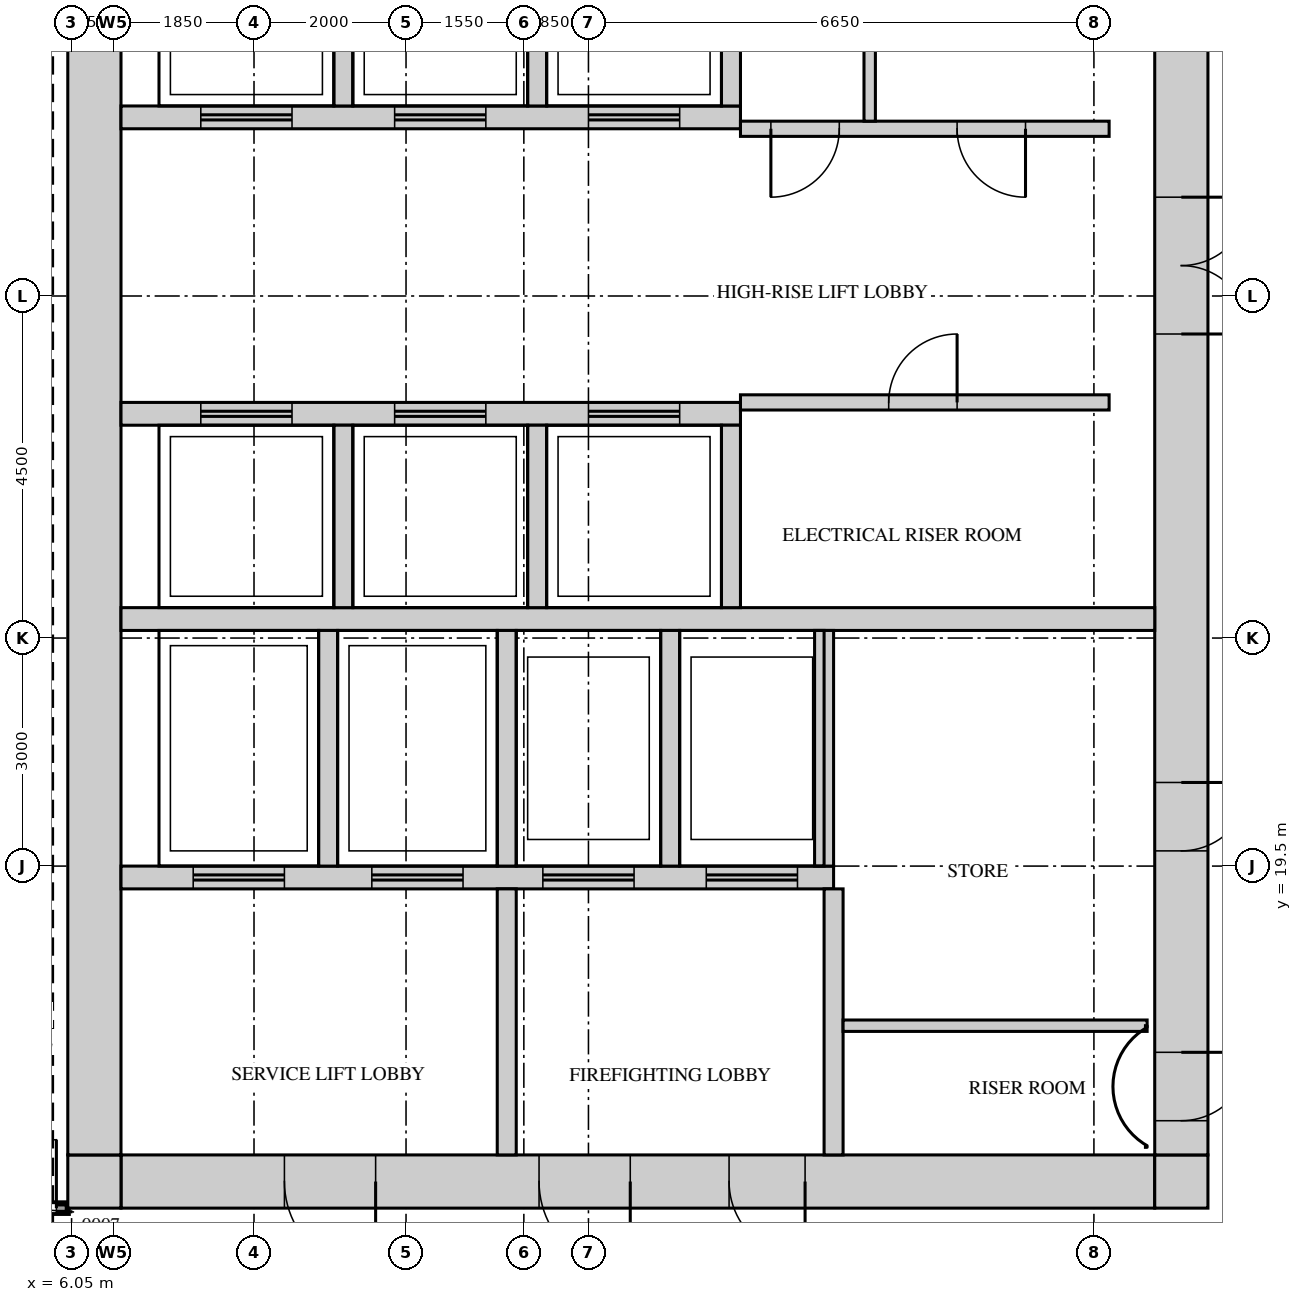
"""IFC4 building model, lengths in metres.
Left out: names, types, materials, properties, quantities, classifications, styles, units other than length and angle.
Written with IfcOpenShell. Run it as: python <this file> out.ifc"""

import sys

from ifc_helpers import new_model, si_unit, direction, frame, frame_2d, origin, place, context, subcontext, project, spatial, rectangle, extrude, source, transform, mapped, element, fill, save


model = new_model("IFC4")
c1 = context("Model", 3, precision=1e-05, world=origin(), true_north=direction((0.0, 1.0)))
c2 = subcontext(c1, "Body", "Model", "MODEL_VIEW")
j1 = project(units=[si_unit("LENGTHUNIT", "METRE"), si_unit("PLANEANGLEUNIT", "RADIAN")], contexts=[c1])
p1 = place(None, origin())
s1 = spatial("IfcSite", under=j1, at=p1, CompositionType="ELEMENT")
p2 = place(p1, origin())
s2 = spatial("IfcBuilding", under=s1, at=p2, CompositionType="ELEMENT")
p3 = place(p2, frame((0.0, 0.0, 266.2)))
s3 = spatial("IfcBuildingStorey", under=s2, at=p3, CompositionType="ELEMENT", Elevation=266.2)
m1 = source(origin(), c2, "Body", "SweptSolid", [
    extrude(rectangle(XDim=13.6, YDim=0.7, at=frame_2d((6.8, 0.0))), origin(), (0.0, 0.0, 1.0), 3.75),
])
p4 = place(p3, frame((6.7, 15.35, 0.0), z_axis=(0.0, 0.0, 1.0), x_axis=(1.0, 0.0, 0.0)))
e1 = element("IfcWall", 1, at=p4, inside=s3, PredefinedType="SHEAR", context=c2, shape_type="MappedRepresentation", body=[
    mapped(m1, transform((0.0, 0.0, 0.0))),
])
m2 = source(origin(), c2, "Body", "SweptSolid", [
    extrude(rectangle(XDim=1.2, YDim=2.1, at=frame_2d((0.6, 1.05))), frame((0.0, 0.36, 0.0), z_axis=(0.0, -1.0, 0.0), x_axis=(1.0, 0.0, 0.0)), (0.0, 0.0, 1.0), 0.72),
])
p5 = place(p4, frame((5.5, 0.0, 0.0)))
e2 = element("IfcOpeningElement", 2, at=p5, cuts=e1, PredefinedType="OPENING", context=c2, shape_type="MappedRepresentation", body=[
    mapped(m2, transform((0.0, 0.0, 0.0))),
])
p6 = place(p4, frame((2.15, 0.0, 0.0)))
e3 = element("IfcOpeningElement", 3, at=p6, cuts=e1, PredefinedType="OPENING", context=c2, shape_type="MappedRepresentation", body=[
    mapped(m2, transform((0.0, 0.0, 0.0))),
])
m3 = source(origin(), c2, "Body", "SweptSolid", [
    extrude(rectangle(XDim=1.0, YDim=2.1, at=frame_2d((0.5, 1.05))), frame((0.0, 0.36, 0.0), z_axis=(0.0, -1.0, 0.0), x_axis=(1.0, 0.0, 0.0)), (0.0, 0.0, 1.0), 0.72),
])
p7 = place(p4, frame((8.0, 0.0, 0.0)))
e4 = element("IfcOpeningElement", 4, at=p7, cuts=e1, PredefinedType="OPENING", context=c2, shape_type="MappedRepresentation", body=[
    mapped(m3, transform((0.0, 0.0, 0.0))),
])
m4 = source(origin(), c2, "Body", "SweptSolid", [
    extrude(rectangle(XDim=0.7, YDim=0.7, at=frame_2d((0.35, 0.0))), origin(), (0.0, 0.0, 1.0), 3.75),
])
for number, where, z_axis, x_axis in (
    (5, (20.3, 15.35, 0.0), (0.0, 0.0, 1.0), (1.0, 0.0, 0.0)),
    (6, (6.0, 15.35, 0.0), (0.0, 0.0, 1.0), (1.0, 0.0, 0.0)),
):
    element("IfcWall", number, at=place(p3, frame(where, z_axis=z_axis, x_axis=x_axis)), inside=s3, PredefinedType="SHEAR", context=c2, shape_type="MappedRepresentation", body=[
        mapped(m4, transform((0.0, 0.0, 0.0))),
    ])
m5 = source(origin(), c2, "Body", "SweptSolid", [
    extrude(rectangle(XDim=22.6, YDim=0.7, at=frame_2d((11.3, 0.0))), origin(), (0.0, 0.0, 1.0), 3.75),
])
p8 = place(p3, frame((20.65, 15.7, 0.0), z_axis=(0.0, 0.0, 1.0), x_axis=(0.0, 1.0, 0.0)))
e7 = element("IfcWall", 7, at=p8, inside=s3, PredefinedType="SHEAR", context=c2, shape_type="MappedRepresentation", body=[
    mapped(m5, transform((0.0, 0.0, 0.0))),
])
m6 = source(origin(), c2, "Body", "SweptSolid", [
    extrude(rectangle(XDim=1.8, YDim=2.1, at=frame_2d((0.9, 1.05))), frame((0.0, 0.36, 0.0), z_axis=(0.0, -1.0, 0.0), x_axis=(1.0, 0.0, 0.0)), (0.0, 0.0, 1.0), 0.72),
])
p9 = place(p8, frame((10.8, 0.0, 0.0)))
e8 = element("IfcOpeningElement", 8, at=p9, cuts=e7, PredefinedType="OPENING", context=c2, shape_type="MappedRepresentation", body=[
    mapped(m6, transform((0.0, 0.0, 0.0))),
])
m7 = source(origin(), c2, "Body", "SweptSolid", [
    extrude(rectangle(XDim=0.9, YDim=2.1, at=frame_2d((0.45, 1.05))), frame((0.0, 0.36, 0.0), z_axis=(0.0, -1.0, 0.0), x_axis=(1.0, 0.0, 0.0)), (0.0, 0.0, 1.0), 0.72),
])
p10 = place(p8, frame((0.45, 0.0, 0.0)))
e9 = element("IfcOpeningElement", 9, at=p10, cuts=e7, PredefinedType="OPENING", context=c2, shape_type="MappedRepresentation", body=[
    mapped(m7, transform((0.0, 0.0, 0.0))),
])
p11 = place(p8, frame((4.0, 0.0, 0.0)))
e10 = element("IfcOpeningElement", 10, at=p11, cuts=e7, PredefinedType="OPENING", context=c2, shape_type="MappedRepresentation", body=[
    mapped(m7, transform((0.0, 0.0, 0.0))),
])
p12 = place(p3, frame((6.35, 15.7, 0.0), z_axis=(0.0, 0.0, 1.0), x_axis=(0.0, 1.0, 0.0)))
e11 = element("IfcWall", 11, at=p12, inside=s3, PredefinedType="SHEAR", context=c2, shape_type="MappedRepresentation", body=[
    mapped(m5, transform((0.0, 0.0, 0.0))),
])
m8 = source(origin(), c2, "Body", "SweptSolid", [
    extrude(rectangle(XDim=13.6, YDim=0.3, at=frame_2d((6.8, 0.0))), origin(), (0.0, 0.0, 1.0), 3.75),
])
p13 = place(p3, frame((6.7, 22.75, 0.0), z_axis=(0.0, 0.0, 1.0), x_axis=(1.0, 0.0, 0.0)))
e12 = element("IfcWall", 12, at=p13, inside=s3, PredefinedType="STANDARD", context=c2, shape_type="MappedRepresentation", body=[
    mapped(m8, transform((0.0, 0.0, 0.0))),
])
m9 = source(origin(), c2, "Body", "SweptSolid", [
    extrude(rectangle(XDim=9.375, YDim=0.3, at=frame_2d((4.688, 0.0))), origin(), (0.0, 0.0, 1.0), 3.75),
])
p14 = place(p3, frame((6.7, 19.35, 0.0), z_axis=(0.0, 0.0, 1.0), x_axis=(1.0, 0.0, 0.0)))
e13 = element("IfcWall", 13, at=p14, inside=s3, PredefinedType="STANDARD", context=c2, shape_type="MappedRepresentation", body=[
    mapped(m9, transform((0.0, 0.0, 0.0))),
])
m10 = source(origin(), c2, "Body", "SweptSolid", [
    extrude(rectangle(XDim=1.2, YDim=2.1, at=frame_2d((0.6, 1.05))), frame((0.0, 0.16, 0.0), z_axis=(0.0, -1.0, 0.0), x_axis=(1.0, 0.0, 0.0)), (0.0, 0.0, 1.0), 0.32),
])
p15 = place(p14, frame((0.95, 0.0, 0.0)))
e14 = element("IfcOpeningElement", 14, at=p15, cuts=e13, PredefinedType="OPENING", context=c2, shape_type="MappedRepresentation", body=[
    mapped(m10, transform((0.0, 0.0, 0.0))),
])
p16 = place(p14, frame((3.3, 0.0, 0.0)))
e15 = element("IfcOpeningElement", 15, at=p16, cuts=e13, PredefinedType="OPENING", context=c2, shape_type="MappedRepresentation", body=[
    mapped(m10, transform((0.0, 0.0, 0.0))),
])
p17 = place(p14, frame((5.55, 0.0, 0.0)))
e16 = element("IfcOpeningElement", 16, at=p17, cuts=e13, PredefinedType="OPENING", context=c2, shape_type="MappedRepresentation", body=[
    mapped(m10, transform((0.0, 0.0, 0.0))),
])
p18 = place(p14, frame((7.7, 0.0, 0.0)))
e17 = element("IfcOpeningElement", 17, at=p18, cuts=e13, PredefinedType="OPENING", context=c2, shape_type="MappedRepresentation", body=[
    mapped(m10, transform((0.0, 0.0, 0.0))),
])
m11 = source(origin(), c2, "Body", "SweptSolid", [
    extrude(rectangle(XDim=8.15, YDim=0.3, at=frame_2d((4.075, 0.0))), origin(), (0.0, 0.0, 1.0), 3.75),
])
p19 = place(p3, frame((6.7, 29.35, 0.0), z_axis=(0.0, 0.0, 1.0), x_axis=(1.0, 0.0, 0.0)))
e18 = element("IfcWall", 18, at=p19, inside=s3, PredefinedType="STANDARD", context=c2, shape_type="MappedRepresentation", body=[
    mapped(m11, transform((0.0, 0.0, 0.0))),
])
p20 = place(p19, frame((1.05, 0.0, 0.0)))
e19 = element("IfcOpeningElement", 19, at=p20, cuts=e18, PredefinedType="OPENING", context=c2, shape_type="MappedRepresentation", body=[
    mapped(m10, transform((0.0, 0.0, 0.0))),
])
p21 = place(p19, frame((3.6, 0.0, 0.0)))
e20 = element("IfcOpeningElement", 20, at=p21, cuts=e18, PredefinedType="OPENING", context=c2, shape_type="MappedRepresentation", body=[
    mapped(m10, transform((0.0, 0.0, 0.0))),
])
p22 = place(p19, frame((6.15, 0.0, 0.0)))
e21 = element("IfcOpeningElement", 21, at=p22, cuts=e18, PredefinedType="OPENING", context=c2, shape_type="MappedRepresentation", body=[
    mapped(m10, transform((0.0, 0.0, 0.0))),
])
p23 = place(p3, frame((6.7, 25.45, 0.0), z_axis=(0.0, 0.0, 1.0), x_axis=(1.0, 0.0, 0.0)))
e22 = element("IfcWall", 22, at=p23, inside=s3, PredefinedType="STANDARD", context=c2, shape_type="MappedRepresentation", body=[
    mapped(m11, transform((0.0, 0.0, 0.0))),
])
p24 = place(p23, frame((1.05, 0.0, 0.0)))
e23 = element("IfcOpeningElement", 23, at=p24, cuts=e22, PredefinedType="OPENING", context=c2, shape_type="MappedRepresentation", body=[
    mapped(m10, transform((0.0, 0.0, 0.0))),
])
p25 = place(p23, frame((3.6, 0.0, 0.0)))
e24 = element("IfcOpeningElement", 24, at=p25, cuts=e22, PredefinedType="OPENING", context=c2, shape_type="MappedRepresentation", body=[
    mapped(m10, transform((0.0, 0.0, 0.0))),
])
p26 = place(p23, frame((6.15, 0.0, 0.0)))
e25 = element("IfcOpeningElement", 25, at=p26, cuts=e22, PredefinedType="OPENING", context=c2, shape_type="MappedRepresentation", body=[
    mapped(m10, transform((0.0, 0.0, 0.0))),
])
m12 = source(origin(), c2, "Body", "SweptSolid", [
    extrude(rectangle(XDim=3.1, YDim=0.25, at=frame_2d((1.55, 0.0))), origin(), (0.0, 0.0, 1.0), 3.75),
])
for number, where, z_axis, x_axis in (
    (26, (9.425, 19.5, 0.0), (0.0, 0.0, 1.0), (0.0, 1.0, 0.0)),
    (27, (11.775, 19.5, 0.0), (0.0, 0.0, 1.0), (0.0, 1.0, 0.0)),
    (28, (13.925, 19.5, 0.0), (0.0, 0.0, 1.0), (0.0, 1.0, 0.0)),
    (29, (15.95, 19.5, 0.0), (0.0, 0.0, 1.0), (0.0, 1.0, 0.0)),
):
    element("IfcWall", number, at=place(p3, frame(where, z_axis=z_axis, x_axis=x_axis)), inside=s3, PredefinedType="STANDARD", context=c2, shape_type="MappedRepresentation", body=[
        mapped(m12, transform((0.0, 0.0, 0.0))),
    ])
m13 = source(origin(), c2, "Body", "SweptSolid", [
    extrude(rectangle(XDim=2.4, YDim=0.25, at=frame_2d((1.2, 0.0))), origin(), (0.0, 0.0, 1.0), 3.75),
])
for number, where, z_axis, x_axis in (
    (30, (9.625, 29.5, 0.0), (0.0, 0.0, 1.0), (0.0, 1.0, 0.0)),
    (31, (12.175, 29.5, 0.0), (0.0, 0.0, 1.0), (0.0, 1.0, 0.0)),
    (32, (14.725, 29.5, 0.0), (0.0, 0.0, 1.0), (0.0, 1.0, 0.0)),
):
    element("IfcWall", number, at=place(p3, frame(where, z_axis=z_axis, x_axis=x_axis)), inside=s3, PredefinedType="STANDARD", context=c2, shape_type="MappedRepresentation", body=[
        mapped(m13, transform((0.0, 0.0, 0.0))),
    ])
m14 = source(origin(), c2, "Body", "SweptSolid", [
    extrude(rectangle(XDim=2.4, YDim=0.25, at=frame_2d((1.2, 0.0))), origin(), (0.0, 0.0, 1.0), 3.75),
])
for number, where, z_axis, x_axis in (
    (33, (9.625, 22.9, 0.0), (0.0, 0.0, 1.0), (0.0, 1.0, 0.0)),
    (34, (12.175, 22.9, 0.0), (0.0, 0.0, 1.0), (0.0, 1.0, 0.0)),
    (35, (14.725, 22.9, 0.0), (0.0, 0.0, 1.0), (0.0, 1.0, 0.0)),
):
    element("IfcWall", number, at=place(p3, frame(where, z_axis=z_axis, x_axis=x_axis)), inside=s3, PredefinedType="STANDARD", context=c2, shape_type="MappedRepresentation", body=[
        mapped(m14, transform((0.0, 0.0, 0.0))),
    ])
m15 = source(origin(), c2, "Body", "SweptSolid", [
    extrude(rectangle(XDim=3.5, YDim=0.25, at=frame_2d((1.75, 0.0))), origin(), (0.0, 0.0, 1.0), 3.75),
])
for number, where, z_axis, x_axis in (
    (36, (16.075, 15.7, 0.0), (0.0, 0.0, 1.0), (0.0, 1.0, 0.0)),
    (37, (11.775, 15.7, 0.0), (0.0, 0.0, 1.0), (0.0, 1.0, 0.0)),
):
    element("IfcWall", number, at=place(p3, frame(where, z_axis=z_axis, x_axis=x_axis)), inside=s3, PredefinedType="STANDARD", context=c2, shape_type="MappedRepresentation", body=[
        mapped(m15, transform((0.0, 0.0, 0.0))),
    ])
m16 = source(origin(), c2, "Body", "SweptSolid", [
    extrude(rectangle(XDim=1.35, YDim=0.125, at=frame_2d((0.675, 0.0))), origin(), (0.0, 0.0, 1.0), 3.8),
])
p27 = place(p3, frame((4.65, 15.0, 0.0), z_axis=(0.0, 0.0, 1.0), x_axis=(1.0, 0.0, 0.0)))
e38 = element("IfcWall", 38, at=p27, inside=s3, PredefinedType="PARTITIONING", context=c2, shape_type="MappedRepresentation", body=[
    mapped(m16, transform((0.0, 0.0, 0.0))),
])
m17 = source(origin(), c2, "Body", "SweptSolid", [
    extrude(rectangle(XDim=0.9, YDim=2.1, at=frame_2d((0.45, 1.05))), frame((0.0, 0.073, 0.0), z_axis=(0.0, -1.0, 0.0), x_axis=(1.0, 0.0, 0.0)), (0.0, 0.0, 1.0), 0.145),
])
p28 = place(p27, frame((0.3, 0.0, 0.0)))
e39 = element("IfcOpeningElement", 39, at=p28, cuts=e38, PredefinedType="OPENING", context=c2, shape_type="MappedRepresentation", body=[
    mapped(m17, transform((0.0, 0.0, 0.0))),
])
m18 = source(origin(), c2, "Body", "SweptSolid", [
    extrude(rectangle(XDim=4.0, YDim=0.15, at=frame_2d((2.0, 0.0))), origin(), (0.0, 0.0, 1.0), 3.8),
])
p29 = place(p3, frame((16.2, 17.4, 0.0), z_axis=(0.0, 0.0, 1.0), x_axis=(1.0, 0.0, 0.0)))
e40 = element("IfcWall", 40, at=p29, inside=s3, PredefinedType="PARTITIONING", context=c2, shape_type="MappedRepresentation", body=[
    mapped(m18, transform((0.0, 0.0, 0.0))),
])
m19 = source(origin(), c2, "Body", "SweptSolid", [
    extrude(rectangle(XDim=4.85, YDim=0.2, at=frame_2d((2.425, 0.0))), origin(), (0.0, 0.0, 1.0), 3.8),
])
p30 = place(p3, frame((14.85, 25.6, 0.0), z_axis=(0.0, 0.0, 1.0), x_axis=(1.0, 0.0, 0.0)))
e41 = element("IfcWall", 41, at=p30, inside=s3, PredefinedType="PARTITIONING", context=c2, shape_type="MappedRepresentation", body=[
    mapped(m19, transform((0.0, 0.0, 0.0))),
])
m20 = source(origin(), c2, "Body", "SweptSolid", [
    extrude(rectangle(XDim=0.9, YDim=2.1, at=frame_2d((0.45, 1.05))), frame((0.0, 0.11, 0.0), z_axis=(0.0, -1.0, 0.0), x_axis=(1.0, 0.0, 0.0)), (0.0, 0.0, 1.0), 0.22),
])
p31 = place(p30, frame((1.95, 0.0, 0.0)))
e42 = element("IfcOpeningElement", 42, at=p31, cuts=e41, PredefinedType="OPENING", context=c2, shape_type="MappedRepresentation", body=[
    mapped(m20, transform((0.0, 0.0, 0.0))),
])
p32 = place(p3, frame((14.85, 29.2, 0.0), z_axis=(0.0, 0.0, 1.0), x_axis=(1.0, 0.0, 0.0)))
e43 = element("IfcWall", 43, at=p32, inside=s3, PredefinedType="PARTITIONING", context=c2, shape_type="MappedRepresentation", body=[
    mapped(m19, transform((0.0, 0.0, 0.0))),
])
p33 = place(p32, frame((0.4, 0.0, 0.0)))
e44 = element("IfcOpeningElement", 44, at=p33, cuts=e43, PredefinedType="OPENING", context=c2, shape_type="MappedRepresentation", body=[
    mapped(m20, transform((0.0, 0.0, 0.0))),
])
p34 = place(p32, frame((2.85, 0.0, 0.0)))
e45 = element("IfcOpeningElement", 45, at=p34, cuts=e43, PredefinedType="OPENING", context=c2, shape_type="MappedRepresentation", body=[
    mapped(m20, transform((0.0, 0.0, 0.0))),
])
m21 = source(origin(), c2, "Body", "SweptSolid", [
    extrude(rectangle(XDim=2.8, YDim=0.15, at=frame_2d((1.4, 0.0))), origin(), (0.0, 0.0, 1.0), 3.8),
])
p35 = place(p3, frame((16.55, 29.3, 0.0), z_axis=(0.0, 0.0, 1.0), x_axis=(0.0, 1.0, 0.0)))
e46 = element("IfcWall", 46, at=p35, inside=s3, PredefinedType="PARTITIONING", context=c2, shape_type="MappedRepresentation", body=[
    mapped(m21, transform((0.0, 0.0, 0.0))),
])
m22 = source(origin(), c2, "Body", "SweptSolid", [
    extrude(rectangle(XDim=0.9, YDim=2.1, at=frame_2d((0.45, 1.05))), frame((0.0, 0.025, 0.0), z_axis=(0.0, -1.0, 0.0), x_axis=(1.0, 0.0, 0.0)), (0.0, 0.0, 1.0), 0.05),
])
p36 = place(p31, origin())
e47 = element("IfcDoor", 47, at=p36, inside=s3, OperationType="SINGLE_SWING_LEFT", PredefinedType="DOOR", context=c2, shape_type="MappedRepresentation", body=[
    mapped(m22, transform((0.0, 0.0, 0.0))),
])
fill(e42, e47)
p37 = place(p33, origin())
e48 = element("IfcDoor", 48, at=p37, inside=s3, OperationType="SINGLE_SWING_LEFT", PredefinedType="DOOR", context=c2, shape_type="MappedRepresentation", body=[
    mapped(m22, transform((0.0, 0.0, 0.0))),
])
fill(e44, e48)
p38 = place(p34, origin())
e49 = element("IfcDoor", 49, at=p38, inside=s3, OperationType="SINGLE_SWING_RIGHT", PredefinedType="DOOR", context=c2, shape_type="MappedRepresentation", body=[
    mapped(m22, transform((0.0, 0.0, 0.0))),
])
fill(e45, e49)
m23 = source(origin(), c2, "Body", "SweptSolid", [
    extrude(rectangle(XDim=1.8, YDim=2.1, at=frame_2d((0.9, 1.05))), frame((0.0, 0.3, 0.0), z_axis=(0.0, -1.0, 0.0), x_axis=(1.0, 0.0, 0.0)), (0.0, 0.0, 1.0), 0.6),
])
p39 = place(p9, origin())
e50 = element("IfcDoor", 50, at=p39, inside=s3, OperationType="DOUBLE_DOOR_SINGLE_SWING", PredefinedType="DOOR", context=c2, shape_type="MappedRepresentation", body=[
    mapped(m23, transform((0.0, 0.0, 0.0))),
])
fill(e8, e50)
m24 = source(origin(), c2, "Body", "SweptSolid", [
    extrude(rectangle(XDim=0.9, YDim=2.1, at=frame_2d((0.45, 1.05))), frame((0.0, 0.3, 0.0), z_axis=(0.0, -1.0, 0.0), x_axis=(1.0, 0.0, 0.0)), (0.0, 0.0, 1.0), 0.6),
])
p40 = place(p10, origin())
e51 = element("IfcDoor", 51, at=p40, inside=s3, OperationType="SINGLE_SWING_RIGHT", PredefinedType="DOOR", context=c2, shape_type="MappedRepresentation", body=[
    mapped(m24, transform((0.0, 0.0, 0.0))),
])
fill(e9, e51)
p41 = place(p11, origin())
e52 = element("IfcDoor", 52, at=p41, inside=s3, OperationType="SINGLE_SWING_RIGHT", PredefinedType="DOOR", context=c2, shape_type="MappedRepresentation", body=[
    mapped(m24, transform((0.0, 0.0, 0.0))),
])
fill(e10, e52)
m25 = source(origin(), c2, "Body", "SweptSolid", [
    extrude(rectangle(XDim=1.2, YDim=2.1, at=frame_2d((0.6, 1.05))), frame((0.0, 0.3, 0.0), z_axis=(0.0, -1.0, 0.0), x_axis=(1.0, 0.0, 0.0)), (0.0, 0.0, 1.0), 0.6),
])
p42 = place(p5, origin())
e53 = element("IfcDoor", 53, at=p42, inside=s3, OperationType="SINGLE_SWING_RIGHT", PredefinedType="DOOR", context=c2, shape_type="MappedRepresentation", body=[
    mapped(m25, transform((0.0, 0.0, 0.0))),
])
fill(e2, e53)
p43 = place(p6, origin())
e54 = element("IfcDoor", 54, at=p43, inside=s3, OperationType="SINGLE_SWING_RIGHT", PredefinedType="DOOR", context=c2, shape_type="MappedRepresentation", body=[
    mapped(m25, transform((0.0, 0.0, 0.0))),
])
fill(e3, e54)
m26 = source(origin(), c2, "Body", "SweptSolid", [
    extrude(rectangle(XDim=1.0, YDim=2.1, at=frame_2d((0.5, 1.05))), frame((0.0, 0.3, 0.0), z_axis=(0.0, -1.0, 0.0), x_axis=(1.0, 0.0, 0.0)), (0.0, 0.0, 1.0), 0.6),
])
p44 = place(p7, origin())
e55 = element("IfcDoor", 55, at=p44, inside=s3, OperationType="SINGLE_SWING_RIGHT", PredefinedType="DOOR", context=c2, shape_type="MappedRepresentation", body=[
    mapped(m26, transform((0.0, 0.0, 0.0))),
])
fill(e4, e55)
p45 = place(p28, origin())
e56 = element("IfcDoor", 56, at=p45, inside=s3, OperationType="SINGLE_SWING_LEFT", PredefinedType="DOOR", context=c2, shape_type="MappedRepresentation", body=[
    mapped(m22, transform((0.0, 0.0, 0.0))),
])
fill(e39, e56)
m27 = source(origin(), c2, "Body", "SweptSolid", [
    extrude(rectangle(XDim=1.2, YDim=2.1, at=frame_2d((0.6, 1.05))), frame((0.0, 0.025, 0.0), z_axis=(0.0, -1.0, 0.0), x_axis=(1.0, 0.0, 0.0)), (0.0, 0.0, 1.0), 0.05),
])
p46 = place(p24, origin())
e57 = element("IfcDoor", 57, at=p46, inside=s3, OperationType="DOUBLE_DOOR_SLIDING", PredefinedType="DOOR", context=c2, shape_type="MappedRepresentation", body=[
    mapped(m27, transform((0.0, 0.0, 0.0))),
])
fill(e23, e57)
p47 = place(p25, origin())
e58 = element("IfcDoor", 58, at=p47, inside=s3, OperationType="DOUBLE_DOOR_SLIDING", PredefinedType="DOOR", context=c2, shape_type="MappedRepresentation", body=[
    mapped(m27, transform((0.0, 0.0, 0.0))),
])
fill(e24, e58)
p48 = place(p26, origin())
e59 = element("IfcDoor", 59, at=p48, inside=s3, OperationType="DOUBLE_DOOR_SLIDING", PredefinedType="DOOR", context=c2, shape_type="MappedRepresentation", body=[
    mapped(m27, transform((0.0, 0.0, 0.0))),
])
fill(e25, e59)
p49 = place(p20, origin())
e60 = element("IfcDoor", 60, at=p49, inside=s3, OperationType="DOUBLE_DOOR_SLIDING", PredefinedType="DOOR", context=c2, shape_type="MappedRepresentation", body=[
    mapped(m27, transform((0.0, 0.0, 0.0))),
])
fill(e19, e60)
p50 = place(p21, origin())
e61 = element("IfcDoor", 61, at=p50, inside=s3, OperationType="DOUBLE_DOOR_SLIDING", PredefinedType="DOOR", context=c2, shape_type="MappedRepresentation", body=[
    mapped(m27, transform((0.0, 0.0, 0.0))),
])
fill(e20, e61)
p51 = place(p22, origin())
e62 = element("IfcDoor", 62, at=p51, inside=s3, OperationType="DOUBLE_DOOR_SLIDING", PredefinedType="DOOR", context=c2, shape_type="MappedRepresentation", body=[
    mapped(m27, transform((0.0, 0.0, 0.0))),
])
fill(e21, e62)
p52 = place(p15, origin())
e63 = element("IfcDoor", 63, at=p52, inside=s3, OperationType="DOUBLE_DOOR_SLIDING", PredefinedType="DOOR", context=c2, shape_type="MappedRepresentation", body=[
    mapped(m27, transform((0.0, 0.0, 0.0))),
])
fill(e14, e63)
p53 = place(p16, origin())
e64 = element("IfcDoor", 64, at=p53, inside=s3, OperationType="DOUBLE_DOOR_SLIDING", PredefinedType="DOOR", context=c2, shape_type="MappedRepresentation", body=[
    mapped(m27, transform((0.0, 0.0, 0.0))),
])
fill(e15, e64)
p54 = place(p17, origin())
e65 = element("IfcDoor", 65, at=p54, inside=s3, OperationType="DOUBLE_DOOR_SLIDING", PredefinedType="DOOR", context=c2, shape_type="MappedRepresentation", body=[
    mapped(m27, transform((0.0, 0.0, 0.0))),
])
fill(e16, e65)
p55 = place(p18, origin())
e66 = element("IfcDoor", 66, at=p55, inside=s3, OperationType="DOUBLE_DOOR_SLIDING", PredefinedType="DOOR", context=c2, shape_type="MappedRepresentation", body=[
    mapped(m27, transform((0.0, 0.0, 0.0))),
])
fill(e17, e66)
save(model, sys.argv[1])
